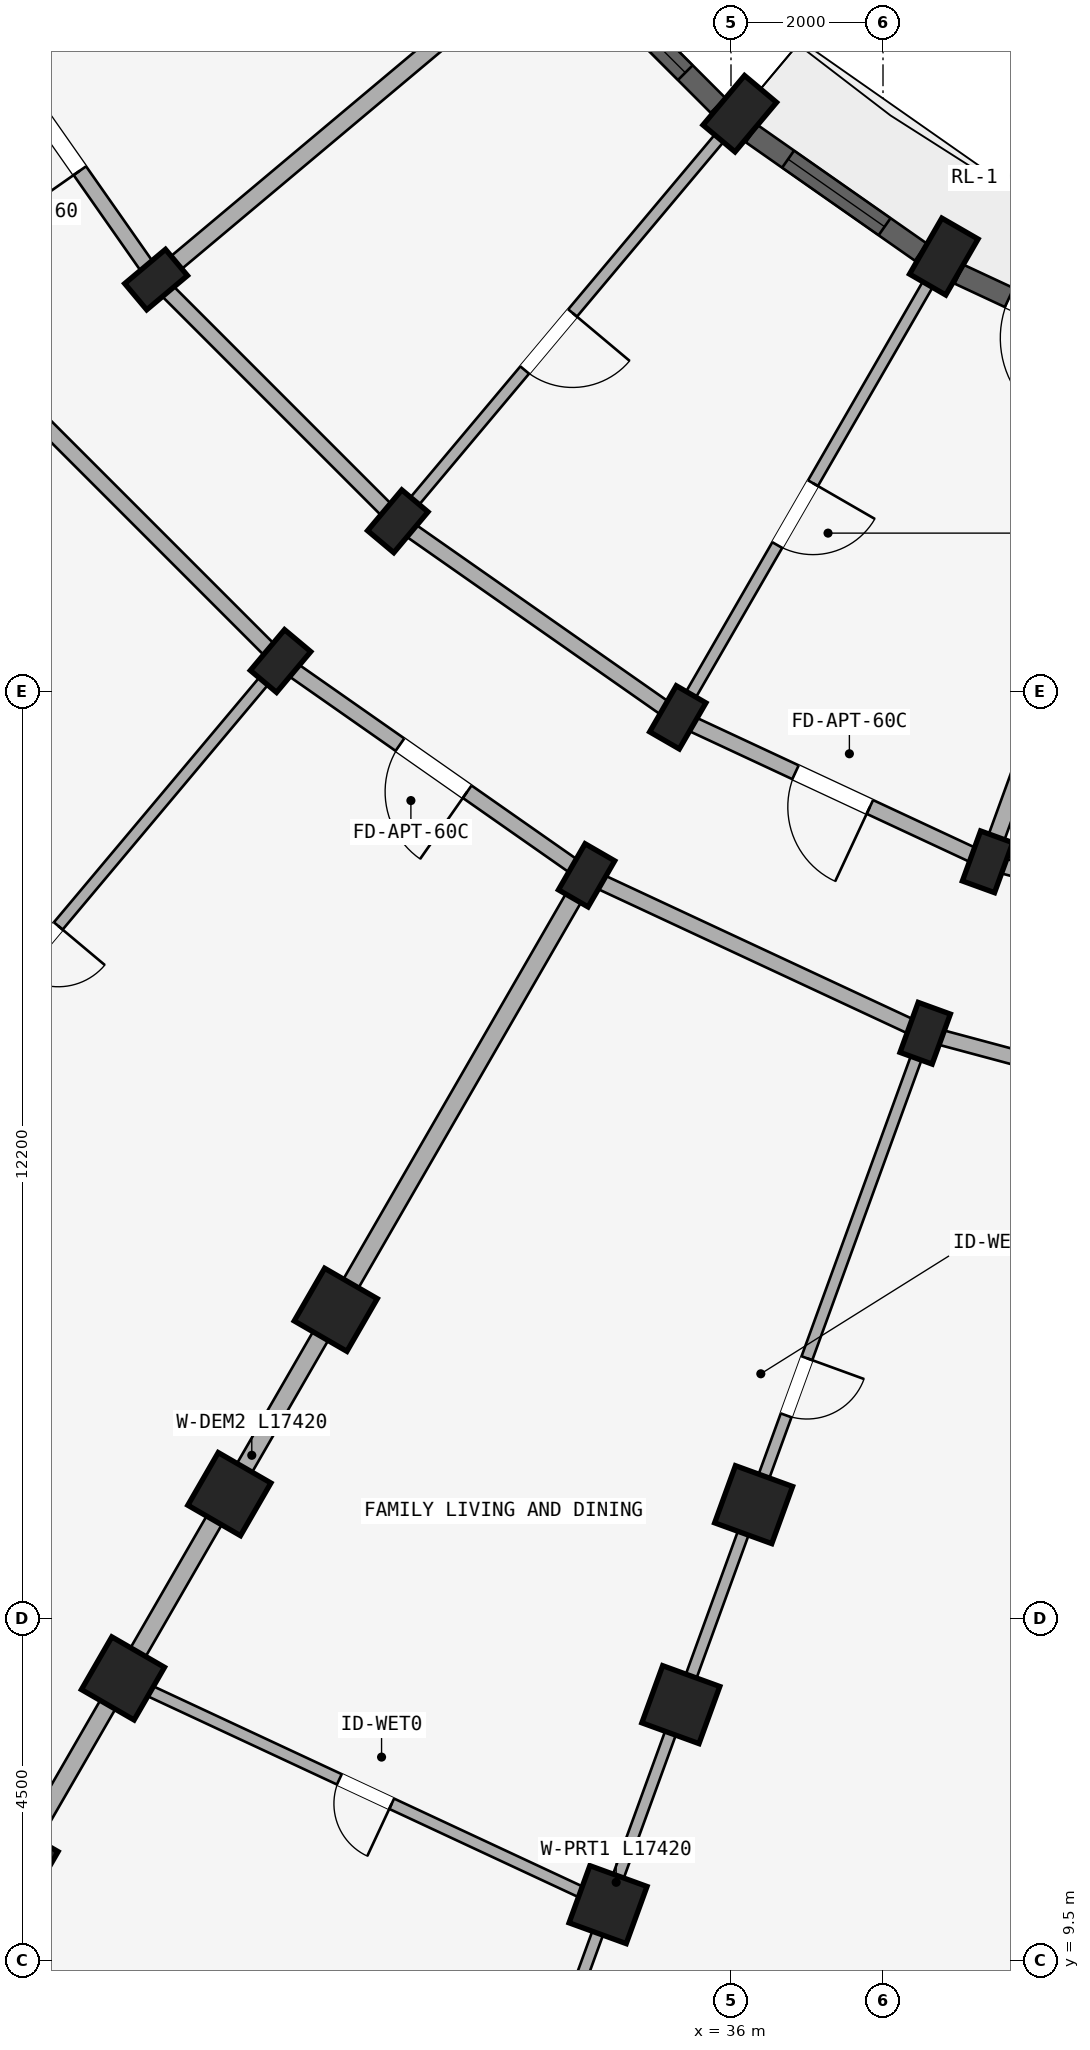
"""IFC4 building model, lengths in metres.
Left out: names, types, materials, properties, quantities, classifications, styles, units other than length and angle.
Written with IfcOpenShell. Run it as: python <this file> out.ifc"""

import sys

from ifc_helpers import new_model, si_unit, direction, frame, frame_2d, origin, origin_2d, place, context, subcontext, project, spatial, rectangle, extrude, element, fill, save


model = new_model("IFC4")
c1 = context("Model", 3, precision=1e-05, world=origin(), true_north=direction((0.0, 1.0)))
c2 = subcontext(c1, "Body", "Model", "MODEL_VIEW")
j1 = project(units=[si_unit("LENGTHUNIT", "METRE"), si_unit("PLANEANGLEUNIT", "RADIAN")], contexts=[c1])
p1 = place(None, origin())
s1 = spatial("IfcSite", under=j1, at=p1, CompositionType="ELEMENT")
p2 = place(p1, origin())
s2 = spatial("IfcBuilding", under=s1, at=p2, CompositionType="ELEMENT")
p3 = place(p2, frame((0.0, 0.0, 11.85)))
s3 = spatial("IfcBuildingStorey", under=s2, at=p3, CompositionType="ELEMENT", Elevation=11.85)
for number, where, z_axis, x_axis in (
    (1, (39.376, 23.956, 0.0), (0.0, 0.0, 1.0), (-0.94, 0.342, 0.0)),
    (2, (38.555, 21.701, 0.0), (0.0, 0.0, 1.0), (-0.94, 0.342, 0.0)),
):
    element("IfcColumn", number, at=place(p3, frame(where, z_axis=z_axis, x_axis=x_axis)), inside=s3, PredefinedType="COLUMN", context=c2, shape_type="SweptSolid", body=[
        extrude(rectangle(XDim=0.45, YDim=0.7, at=origin_2d()), origin(), (0.0, 0.0, 1.0), 2.93),
    ])
for number, where, z_axis, x_axis in (
    (3, (36.298, 15.499, 0.0), (0.0, 0.0, 1.0), (-0.94, 0.342, 0.0)),
    (4, (35.34, 12.868, 0.0), (0.0, 0.0, 1.0), (-0.94, 0.342, 0.0)),
    (5, (34.382, 10.236, 0.0), (0.0, 0.0, 1.0), (-0.94, 0.342, 0.0)),
):
    element("IfcColumn", number, at=place(p3, frame(where, z_axis=z_axis, x_axis=x_axis)), inside=s3, PredefinedType="COLUMN", context=c2, shape_type="SweptSolid", body=[
        extrude(rectangle(XDim=0.8, YDim=0.8, at=origin_2d()), origin(), (0.0, 0.0, 1.0), 2.93),
    ])
p4 = place(p3, frame((38.8, 31.919, 0.0), z_axis=(0.0, 0.0, 1.0), x_axis=(-0.866025403784, 0.5, 0.0)))
e6 = element("IfcColumn", 6, at=p4, inside=s3, PredefinedType="COLUMN", context=c2, shape_type="SweptSolid", body=[
    extrude(rectangle(XDim=0.55, YDim=0.85, at=origin_2d()), origin(), (0.0, 0.0, 1.0), 2.93),
])
for number, where, z_axis, x_axis in (
    (7, (35.3, 25.856, 0.0), (0.0, 0.0, 1.0), (-0.866, 0.5, 0.0)),
    (8, (34.1, 23.778, 0.0), (0.0, 0.0, 1.0), (-0.866, 0.5, 0.0)),
):
    element("IfcColumn", number, at=place(p3, frame(where, z_axis=z_axis, x_axis=x_axis)), inside=s3, PredefinedType="COLUMN", context=c2, shape_type="SweptSolid", body=[
        extrude(rectangle(XDim=0.45, YDim=0.7, at=origin_2d()), origin(), (0.0, 0.0, 1.0), 2.93),
    ])
for number, where, z_axis, x_axis in (
    (9, (30.8, 18.062, 0.0), (0.0, 0.0, 1.0), (-0.866, 0.5, 0.0)),
    (10, (29.4, 15.637, 0.0), (0.0, 0.0, 1.0), (-0.866, 0.5, 0.0)),
    (11, (28.0, 13.213, 0.0), (0.0, 0.0, 1.0), (-0.866, 0.5, 0.0)),
    (12, (26.6, 10.788, 0.0), (0.0, 0.0, 1.0), (-0.866, 0.5, 0.0)),
):
    element("IfcColumn", number, at=place(p3, frame(where, z_axis=z_axis, x_axis=x_axis)), inside=s3, PredefinedType="COLUMN", context=c2, shape_type="SweptSolid", body=[
        extrude(rectangle(XDim=0.8, YDim=0.8, at=origin_2d()), origin(), (0.0, 0.0, 1.0), 2.93),
    ])
p5 = place(p3, frame((36.115, 33.798, 0.0), z_axis=(0.0, 0.0, 1.0), x_axis=(-0.766044443119, 0.642787609687, 0.0)))
e13 = element("IfcColumn", 13, at=p5, inside=s3, PredefinedType="COLUMN", context=c2, shape_type="SweptSolid", body=[
    extrude(rectangle(XDim=0.55, YDim=0.85, at=origin_2d()), origin(), (0.0, 0.0, 1.0), 2.93),
])
for number, where, z_axis, x_axis in (
    (14, (31.616, 28.436, 0.0), (0.0, 0.0, 1.0), (-0.766, 0.643, 0.0)),
    (15, (30.073, 26.598, 0.0), (0.0, 0.0, 1.0), (-0.766, 0.643, 0.0)),
    (16, (28.436, 31.616, 0.0), (0.0, 0.0, 1.0), (-0.643, 0.766, 0.0)),
):
    element("IfcColumn", number, at=place(p3, frame(where, z_axis=z_axis, x_axis=x_axis)), inside=s3, PredefinedType="COLUMN", context=c2, shape_type="SweptSolid", body=[
        extrude(rectangle(XDim=0.45, YDim=0.7, at=origin_2d()), origin(), (0.0, 0.0, 1.0), 2.93),
    ])
p6 = place(p3, frame((43.72, 22.792, 0.0), z_axis=(0.0, 0.0, 1.0), x_axis=(-0.965934240054, 0.258787642463, 0.0)))
e17 = element("IfcWall", 17, at=p6, inside=s3, PredefinedType="STANDARD", context=c2, shape_type="SweptSolid", body=[
    extrude(rectangle(XDim=4.497, YDim=0.2, at=frame_2d((2.249, 0.0))), origin(), (0.0, 0.0, 1.0), 2.372),
])
p7 = place(p3, frame((43.303, 20.428, 0.0), z_axis=(0.0, 0.0, 1.0), x_axis=(-0.965930095386, 0.258803112091, 0.0)))
e18 = element("IfcWall", 18, at=p7, inside=s3, PredefinedType="STANDARD", context=c2, shape_type="SweptSolid", body=[
    extrude(rectangle(XDim=4.916, YDim=0.2, at=frame_2d((2.458, 0.0))), origin(), (0.0, 0.0, 1.0), 2.372),
])
p8 = place(p3, frame((39.376, 23.956, 0.0), z_axis=(0.0, 0.0, 1.0), x_axis=(-0.906307919131, 0.422617978463, 0.0)))
e19 = element("IfcWall", 19, at=p8, inside=s3, PredefinedType="STANDARD", context=c2, shape_type="SweptSolid", body=[
    extrude(rectangle(XDim=4.497, YDim=0.2, at=frame_2d((2.249, 0.0))), origin(), (0.0, 0.0, 1.0), 2.372),
])
p9 = place(p8, frame((1.709, 0.0, 0.0)))
e20 = element("IfcOpeningElement", 20, at=p9, cuts=e19, PredefinedType="OPENING", context=c2, shape_type="SweptSolid", body=[
    extrude(rectangle(XDim=1.08, YDim=2.15, at=frame_2d((0.54, 1.075))), frame((0.0, 0.11, 0.0), z_axis=(0.0, -1.0, 0.0), x_axis=(1.0, 0.0, 0.0)), (0.0, 0.0, 1.0), 0.22),
])
p10 = place(p3, frame((38.555, 21.701, 0.0), z_axis=(0.0, 0.0, 1.0), x_axis=(-0.906302381024, 0.422629854778, 0.0)))
e21 = element("IfcWall", 21, at=p10, inside=s3, PredefinedType="STANDARD", context=c2, shape_type="SweptSolid", body=[
    extrude(rectangle(XDim=4.915, YDim=0.2, at=frame_2d((2.458, 0.0))), origin(), (0.0, 0.0, 1.0), 2.372),
])
p11 = place(p3, frame((35.3, 25.856, 0.0), z_axis=(0.0, 0.0, 1.0), x_axis=(-0.819155404658, 0.573571637217, 0.0)))
e22 = element("IfcWall", 22, at=p11, inside=s3, PredefinedType="STANDARD", context=c2, shape_type="SweptSolid", body=[
    extrude(rectangle(XDim=4.497, YDim=0.2, at=frame_2d((2.249, 0.0))), origin(), (0.0, 0.0, 1.0), 2.372),
])
p12 = place(p3, frame((34.1, 23.778, 0.0), z_axis=(0.0, 0.0, 1.0), x_axis=(-0.819140911474, 0.573592335331, 0.0)))
e23 = element("IfcWall", 23, at=p12, inside=s3, PredefinedType="STANDARD", context=c2, shape_type="SweptSolid", body=[
    extrude(rectangle(XDim=4.916, YDim=0.2, at=frame_2d((2.458, 0.0))), origin(), (0.0, 0.0, 1.0), 2.372),
])
p13 = place(p12, frame((1.918, 0.0, 0.0)))
e24 = element("IfcOpeningElement", 24, at=p13, cuts=e23, PredefinedType="OPENING", context=c2, shape_type="SweptSolid", body=[
    extrude(rectangle(XDim=1.08, YDim=2.15, at=frame_2d((0.54, 1.075))), frame((0.0, 0.11, 0.0), z_axis=(0.0, -1.0, 0.0), x_axis=(1.0, 0.0, 0.0)), (0.0, 0.0, 1.0), 0.22),
])
p14 = place(p3, frame((31.616, 28.436, 0.0), z_axis=(0.0, 0.0, 1.0), x_axis=(-0.707106781187, 0.707106781187, 0.0)))
e25 = element("IfcWall", 25, at=p14, inside=s3, PredefinedType="STANDARD", context=c2, shape_type="SweptSolid", body=[
    extrude(rectangle(XDim=4.497, YDim=0.2, at=frame_2d((2.249, 0.0))), origin(), (0.0, 0.0, 1.0), 2.372),
])
p15 = place(p3, frame((30.073, 26.598, 0.0), z_axis=(0.0, 0.0, 1.0), x_axis=(-0.707106781187, 0.707106781187, 0.0)))
e26 = element("IfcWall", 26, at=p15, inside=s3, PredefinedType="STANDARD", context=c2, shape_type="SweptSolid", body=[
    extrude(rectangle(XDim=4.916, YDim=0.2, at=frame_2d((2.458, 0.0))), origin(), (0.0, 0.0, 1.0), 2.372),
])
p16 = place(p3, frame((28.436, 31.616, 0.0), z_axis=(0.0, 0.0, 1.0), x_axis=(-0.573571637217, 0.819155404658, 0.0)))
e27 = element("IfcWall", 27, at=p16, inside=s3, PredefinedType="STANDARD", context=c2, shape_type="SweptSolid", body=[
    extrude(rectangle(XDim=4.497, YDim=0.2, at=frame_2d((2.249, 0.0))), origin(), (0.0, 0.0, 1.0), 2.372),
])
p17 = place(p16, frame((1.749, 0.0, 0.0)))
e28 = element("IfcOpeningElement", 28, at=p17, cuts=e27, PredefinedType="OPENING", context=c2, shape_type="SweptSolid", body=[
    extrude(rectangle(XDim=1.0, YDim=2.15, at=frame_2d((0.5, 1.075))), frame((0.0, 0.11, 0.0), z_axis=(0.0, -1.0, 0.0), x_axis=(1.0, 0.0, 0.0)), (0.0, 0.0, 1.0), 0.22),
])
p18 = place(p3, frame((41.702, 30.346, 0.0), z_axis=(0.0, 0.0, 1.0), x_axis=(-0.342010221662, -0.939696231917, 0.0)))
e29 = element("IfcWall", 29, at=p18, inside=s3, PredefinedType="STANDARD", context=c2, shape_type="SweptSolid", body=[
    extrude(rectangle(XDim=6.75, YDim=0.22, at=frame_2d((3.375, 0.0))), origin(), (0.0, 0.0, 1.0), 2.372),
])
p19 = place(p3, frame((38.521, 21.607, 0.0), z_axis=(0.0, 0.0, 1.0), x_axis=(-0.342022120477, -0.939691901159, 0.0)))
e30 = element("IfcWall", 30, at=p19, inside=s3, PredefinedType="PARTITIONING", context=c2, shape_type="SweptSolid", body=[
    extrude(rectangle(XDim=17.42, YDim=0.15, at=frame_2d((8.71, 0.0))), origin(), (0.0, 0.0, 1.0), 2.372),
])
p20 = place(p19, frame((4.45, 0.0, 0.0)))
e31 = element("IfcOpeningElement", 31, at=p20, cuts=e30, PredefinedType="OPENING", context=c2, shape_type="SweptSolid", body=[
    extrude(rectangle(XDim=0.8, YDim=2.1, at=frame_2d((0.4, 1.05))), frame((0.0, 0.085, 0.0), z_axis=(0.0, -1.0, 0.0), x_axis=(1.0, 0.0, 0.0)), (0.0, 0.0, 1.0), 0.17),
])
p21 = place(p3, frame((38.7, 31.746, 0.0), z_axis=(0.0, 0.0, 1.0), x_axis=(-0.499997969693, -0.866026575979, 0.0)))
e32 = element("IfcWall", 32, at=p21, inside=s3, PredefinedType="PARTITIONING", context=c2, shape_type="SweptSolid", body=[
    extrude(rectangle(XDim=6.75, YDim=0.15, at=frame_2d((3.375, 0.0))), origin(), (0.0, 0.0, 1.0), 2.372),
])
p22 = place(p21, frame((3.242, 0.0, 0.0)))
e33 = element("IfcOpeningElement", 33, at=p22, cuts=e32, PredefinedType="OPENING", context=c2, shape_type="SweptSolid", body=[
    extrude(rectangle(XDim=0.94, YDim=2.1, at=frame_2d((0.47, 1.05))), frame((0.0, 0.085, 0.0), z_axis=(0.0, -1.0, 0.0), x_axis=(1.0, 0.0, 0.0)), (0.0, 0.0, 1.0), 0.17),
])
p23 = place(p3, frame((34.05, 23.691, 0.0), z_axis=(0.0, 0.0, 1.0), x_axis=(-0.499997843263, -0.866026648973, 0.0)))
e34 = element("IfcWall", 34, at=p23, inside=s3, PredefinedType="STANDARD", context=c2, shape_type="SweptSolid", body=[
    extrude(rectangle(XDim=17.42, YDim=0.23, at=frame_2d((8.71, 0.0))), origin(), (0.0, 0.0, 1.0), 2.372),
])
p24 = place(p3, frame((35.987, 33.645, 0.0), z_axis=(0.0, 0.0, 1.0), x_axis=(-0.642784846501, -0.766046761698, 0.0)))
e35 = element("IfcWall", 35, at=p24, inside=s3, PredefinedType="PARTITIONING", context=c2, shape_type="SweptSolid", body=[
    extrude(rectangle(XDim=6.75, YDim=0.15, at=frame_2d((3.375, 0.0))), origin(), (0.0, 0.0, 1.0), 2.372),
])
p25 = place(p24, frame((3.222, 0.0, 0.0)))
e36 = element("IfcOpeningElement", 36, at=p25, cuts=e35, PredefinedType="OPENING", context=c2, shape_type="SweptSolid", body=[
    extrude(rectangle(XDim=0.98, YDim=2.12, at=frame_2d((0.49, 1.06))), frame((0.0, 0.085, 0.0), z_axis=(0.0, -1.0, 0.0), x_axis=(1.0, 0.0, 0.0)), (0.0, 0.0, 1.0), 0.17),
])
p26 = place(p3, frame((30.009, 26.521, 0.0), z_axis=(0.0, 0.0, 1.0), x_axis=(-0.642784757967, -0.766046835987, 0.0)))
e37 = element("IfcWall", 37, at=p26, inside=s3, PredefinedType="PARTITIONING", context=c2, shape_type="SweptSolid", body=[
    extrude(rectangle(XDim=17.42, YDim=0.15, at=frame_2d((8.71, 0.0))), origin(), (0.0, 0.0, 1.0), 2.372),
])
p27 = place(p26, frame((4.45, 0.0, 0.0)))
e38 = element("IfcOpeningElement", 38, at=p27, cuts=e37, PredefinedType="OPENING", context=c2, shape_type="SweptSolid", body=[
    extrude(rectangle(XDim=0.8, YDim=2.1, at=frame_2d((0.4, 1.05))), frame((0.0, 0.085, 0.0), z_axis=(0.0, -1.0, 0.0), x_axis=(1.0, 0.0, 0.0)), (0.0, 0.0, 1.0), 0.17),
])
p28 = place(p3, frame((33.645, 35.987, 0.0), z_axis=(0.0, 0.0, 1.0), x_axis=(-0.766046761698, -0.642784846501, 0.0)))
e39 = element("IfcWall", 39, at=p28, inside=s3, PredefinedType="STANDARD", context=c2, shape_type="SweptSolid", body=[
    extrude(rectangle(XDim=6.75, YDim=0.22, at=frame_2d((3.375, 0.0))), origin(), (0.0, 0.0, 1.0), 2.372),
])
p29 = place(p3, frame((34.382, 10.236, 0.0), z_axis=(0.0, 0.0, 1.0), x_axis=(-0.906297360311, 0.422640621205, 0.0)))
e40 = element("IfcWall", 40, at=p29, inside=s3, PredefinedType="PLUMBINGWALL", context=c2, shape_type="SweptSolid", body=[
    extrude(rectangle(XDim=7.042, YDim=0.15, at=frame_2d((3.521, 0.0))), origin(), (0.0, 0.0, 1.0), 2.372),
])
p30 = place(p29, frame((3.141, 0.0, 0.0)))
e41 = element("IfcOpeningElement", 41, at=p30, cuts=e40, PredefinedType="OPENING", context=c2, shape_type="SweptSolid", body=[
    extrude(rectangle(XDim=0.76, YDim=2.05, at=frame_2d((0.38, 1.025))), frame((0.0, 0.085, 0.0), z_axis=(0.0, -1.0, 0.0), x_axis=(1.0, 0.0, 0.0)), (0.0, 0.0, 1.0), 0.17),
])
p31 = place(p3, frame((41.464, 30.539, 0.0), z_axis=(0.0, 0.0, 1.0), x_axis=(-0.906311629168, 0.422610022166, 0.0)))
e42 = element("IfcWall", 42, at=p31, inside=s3, PredefinedType="STANDARD", context=c2, shape_type="SweptSolid", body=[
    extrude(rectangle(XDim=2.718, YDim=0.275, at=frame_2d((1.359, 0.0))), origin(), (0.0, 0.0, 1.0), 2.422),
])
p32 = place(p31, frame((0.729, 0.0, 0.0)))
e43 = element("IfcOpeningElement", 43, at=p32, cuts=e42, PredefinedType="OPENING", context=c2, shape_type="SweptSolid", body=[
    extrude(rectangle(XDim=1.26, YDim=2.15, at=frame_2d((0.63, 1.075))), frame((0.0, 0.147, 0.0), z_axis=(0.0, -1.0, 0.0), x_axis=(1.0, 0.0, 0.0)), (0.0, 0.0, 1.0), 0.295),
])
p33 = place(p3, frame((38.499, 31.977, 0.0), z_axis=(0.0, 0.0, 1.0), x_axis=(-0.81917282593, 0.573546755948, 0.0)))
e44 = element("IfcWall", 44, at=p33, inside=s3, PredefinedType="STANDARD", context=c2, shape_type="SweptSolid", body=[
    extrude(rectangle(XDim=2.718, YDim=0.275, at=frame_2d((1.359, 0.0))), origin(), (0.0, 0.0, 1.0), 2.422),
])
p34 = place(p33, frame((0.584, 0.0, 0.622)))
e45 = element("IfcOpeningElement", 45, at=p34, cuts=e44, PredefinedType="OPENING", context=c2, shape_type="SweptSolid", body=[
    extrude(rectangle(XDim=1.55, YDim=1.6, at=frame_2d((0.775, 0.8))), frame((0.0, 0.147, 0.0), z_axis=(0.0, -1.0, 0.0), x_axis=(1.0, 0.0, 0.0)), (0.0, 0.0, 1.0), 0.295),
])
p35 = place(p3, frame((35.829, 33.908, 0.0), z_axis=(0.0, 0.0, 1.0), x_axis=(-0.707106781187, 0.707106781187, 0.0)))
e46 = element("IfcWall", 46, at=p35, inside=s3, PredefinedType="STANDARD", context=c2, shape_type="SweptSolid", body=[
    extrude(rectangle(XDim=2.718, YDim=0.275, at=frame_2d((1.359, 0.0))), origin(), (0.0, 0.0, 1.0), 2.422),
])
p36 = place(p35, frame((0.609, 0.0, 0.572)))
e47 = element("IfcOpeningElement", 47, at=p36, cuts=e46, PredefinedType="OPENING", context=c2, shape_type="SweptSolid", body=[
    extrude(rectangle(XDim=1.5, YDim=1.65, at=frame_2d((0.75, 0.825))), frame((0.0, 0.147, 0.0), z_axis=(0.0, -1.0, 0.0), x_axis=(1.0, 0.0, 0.0)), (0.0, 0.0, 1.0), 0.295),
])
p37 = place(p34, origin())
e48 = element("IfcWindow", 48, at=p37, inside=s3, PartitioningType="DOUBLE_PANEL_VERTICAL", PredefinedType="WINDOW", context=c2, shape_type="SweptSolid", body=[
    extrude(rectangle(XDim=1.55, YDim=1.6, at=frame_2d((0.775, 0.8))), frame((0.0, 0.03, 0.0), z_axis=(0.0, -1.0, 0.0), x_axis=(1.0, 0.0, 0.0)), (0.0, 0.0, 1.0), 0.06),
])
fill(e45, e48)
p38 = place(p36, origin())
e49 = element("IfcWindow", 49, at=p38, inside=s3, PartitioningType="DOUBLE_PANEL_VERTICAL", PredefinedType="WINDOW", context=c2, shape_type="SweptSolid", body=[
    extrude(rectangle(XDim=1.5, YDim=1.65, at=frame_2d((0.75, 0.825))), frame((0.0, 0.03, 0.0), z_axis=(0.0, -1.0, 0.0), x_axis=(1.0, 0.0, 0.0)), (0.0, 0.0, 1.0), 0.06),
])
fill(e47, e49)
p39 = place(p20, origin())
e50 = element("IfcDoor", 50, at=p39, inside=s3, OperationType="SINGLE_SWING_LEFT", PredefinedType="DOOR", context=c2, shape_type="SweptSolid", body=[
    extrude(rectangle(XDim=0.8, YDim=2.1, at=frame_2d((0.4, 1.05))), frame((0.0, 0.025, 0.0), z_axis=(0.0, -1.0, 0.0), x_axis=(1.0, 0.0, 0.0)), (0.0, 0.0, 1.0), 0.05),
])
fill(e31, e50)
p40 = place(p22, frame((0.94, 0.0, 0.0), z_axis=(0.0, 0.0, 1.0), x_axis=(-1.0, 0.0, 0.0)))
e51 = element("IfcDoor", 51, at=p40, inside=s3, OperationType="SINGLE_SWING_RIGHT", PredefinedType="DOOR", context=c2, shape_type="SweptSolid", body=[
    extrude(rectangle(XDim=0.94, YDim=2.1, at=frame_2d((0.47, 1.05))), frame((0.0, 0.025, 0.0), z_axis=(0.0, -1.0, 0.0), x_axis=(1.0, 0.0, 0.0)), (0.0, 0.0, 1.0), 0.05),
])
fill(e33, e51)
p41 = place(p25, origin())
e52 = element("IfcDoor", 52, at=p41, inside=s3, OperationType="SINGLE_SWING_LEFT", PredefinedType="DOOR", context=c2, shape_type="SweptSolid", body=[
    extrude(rectangle(XDim=0.98, YDim=2.12, at=frame_2d((0.49, 1.06))), frame((0.0, 0.025, 0.0), z_axis=(0.0, -1.0, 0.0), x_axis=(1.0, 0.0, 0.0)), (0.0, 0.0, 1.0), 0.05),
])
fill(e36, e52)
p42 = place(p27, frame((0.8, 0.0, 0.0), z_axis=(0.0, 0.0, 1.0), x_axis=(-1.0, 0.0, 0.0)))
e53 = element("IfcDoor", 53, at=p42, inside=s3, OperationType="SINGLE_SWING_RIGHT", PredefinedType="DOOR", context=c2, shape_type="SweptSolid", body=[
    extrude(rectangle(XDim=0.8, YDim=2.1, at=frame_2d((0.4, 1.05))), frame((0.0, 0.025, 0.0), z_axis=(0.0, -1.0, 0.0), x_axis=(1.0, 0.0, 0.0)), (0.0, 0.0, 1.0), 0.05),
])
fill(e38, e53)
p43 = place(p30, origin())
e54 = element("IfcDoor", 54, at=p43, inside=s3, OperationType="SINGLE_SWING_LEFT", PredefinedType="DOOR", context=c2, shape_type="SweptSolid", body=[
    extrude(rectangle(XDim=0.76, YDim=2.05, at=frame_2d((0.38, 1.025))), frame((0.0, 0.025, 0.0), z_axis=(0.0, -1.0, 0.0), x_axis=(1.0, 0.0, 0.0)), (0.0, 0.0, 1.0), 0.05),
])
fill(e41, e54)
p44 = place(p13, frame((1.08, 0.0, 0.0), z_axis=(0.0, 0.0, 1.0), x_axis=(-1.0, 0.0, 0.0)))
e55 = element("IfcDoor", 55, at=p44, inside=s3, OperationType="SINGLE_SWING_RIGHT", PredefinedType="DOOR", context=c2, shape_type="SweptSolid", body=[
    extrude(rectangle(XDim=1.08, YDim=2.15, at=frame_2d((0.54, 1.075))), frame((0.0, 0.025, 0.0), z_axis=(0.0, -1.0, 0.0), x_axis=(1.0, 0.0, 0.0)), (0.0, 0.0, 1.0), 0.05),
])
fill(e24, e55)
p45 = place(p9, origin())
e56 = element("IfcDoor", 56, at=p45, inside=s3, OperationType="SINGLE_SWING_LEFT", PredefinedType="DOOR", context=c2, shape_type="SweptSolid", body=[
    extrude(rectangle(XDim=1.08, YDim=2.15, at=frame_2d((0.54, 1.075))), frame((0.0, 0.025, 0.0), z_axis=(0.0, -1.0, 0.0), x_axis=(1.0, 0.0, 0.0)), (0.0, 0.0, 1.0), 0.05),
])
fill(e20, e56)
p46 = place(p17, frame((1.0, 0.0, 0.0), z_axis=(0.0, 0.0, 1.0), x_axis=(-1.0, 0.0, 0.0)))
e57 = element("IfcDoor", 57, at=p46, inside=s3, OperationType="SINGLE_SWING_RIGHT", PredefinedType="DOOR", context=c2, shape_type="SweptSolid", body=[
    extrude(rectangle(XDim=1.0, YDim=2.15, at=frame_2d((0.5, 1.075))), frame((0.0, 0.025, 0.0), z_axis=(0.0, -1.0, 0.0), x_axis=(1.0, 0.0, 0.0)), (0.0, 0.0, 1.0), 0.05),
])
fill(e28, e57)
p47 = place(p32, frame((1.26, 0.0, 0.0), z_axis=(0.0, 0.0, 1.0), x_axis=(-1.0, 0.0, 0.0)))
e58 = element("IfcDoor", 58, at=p47, inside=s3, OperationType="SINGLE_SWING_RIGHT", PredefinedType="DOOR", context=c2, shape_type="SweptSolid", body=[
    extrude(rectangle(XDim=1.26, YDim=2.15, at=frame_2d((0.63, 1.075))), frame((0.0, 0.025, 0.0), z_axis=(0.0, -1.0, 0.0), x_axis=(1.0, 0.0, 0.0)), (0.0, 0.0, 1.0), 0.05),
])
fill(e43, e58)
save(model, sys.argv[1])
